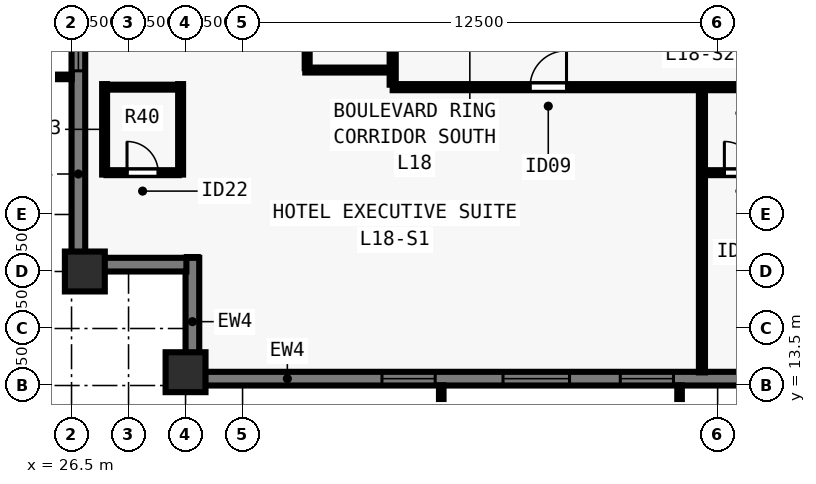
"""IFC4 building model, lengths in metres.
Left out: names, types, materials, properties, quantities, classifications, styles, units other than length and angle.
Written with IfcOpenShell. Run it as: python <this file> out.ifc"""

import sys

from ifc_helpers import new_model, si_unit, direction, frame, frame_2d, origin, origin_2d, place, context, subcontext, project, spatial, rectangle, extrude, element, fill, save


model = new_model("IFC4")
c1 = context("Model", 3, precision=1e-05, world=origin(), true_north=direction((0.0, 1.0)))
c2 = subcontext(c1, "Body", "Model", "MODEL_VIEW")
j1 = project(units=[si_unit("LENGTHUNIT", "METRE"), si_unit("PLANEANGLEUNIT", "RADIAN")], contexts=[c1])
p1 = place(None, origin())
s1 = spatial("IfcSite", under=j1, at=p1, CompositionType="ELEMENT")
p2 = place(p1, origin())
s2 = spatial("IfcBuilding", under=s1, at=p2, CompositionType="ELEMENT")
p3 = place(p2, frame((0.0, 0.0, 69.0)))
s3 = spatial("IfcBuildingStorey", under=s2, at=p3, CompositionType="ELEMENT", Elevation=69.0)
for number, where, z_axis, x_axis in (
    (1, (29.5, 13.85, 0.0), (0.0, 0.0, 1.0), (1.0, 0.0, 0.0)),
    (2, (26.85, 16.5, 0.0), (0.0, 0.0, 1.0), (0.0, 1.0, 0.0)),
):
    element("IfcColumn", number, at=place(p3, frame(where, z_axis=z_axis, x_axis=x_axis)), inside=s3, PredefinedType="COLUMN", context=c2, shape_type="SweptSolid", body=[
        extrude(rectangle(XDim=1.05, YDim=1.05, at=origin_2d()), origin(), (0.0, 0.0, 1.0), 3.5),
    ])
p4 = place(p3, frame((74.5, 13.68, 0.0), z_axis=(0.0, 0.0, 1.0), x_axis=(-1.0, 0.0, 0.0)))
e3 = element("IfcWall", 3, at=p4, inside=s3, PredefinedType="SOLIDWALL", context=c2, shape_type="SweptSolid", body=[
    extrude(rectangle(XDim=44.662, YDim=0.36, at=frame_2d((22.331, 0.0))), origin(), (0.0, 0.0, 1.0), 3.28),
])
p5 = place(p4, frame((4.83, 0.0, 0.8)))
e4 = element("IfcOpeningElement", 4, at=p5, cuts=e3, PredefinedType="OPENING", context=c2, shape_type="SweptSolid", body=[
    extrude(rectangle(XDim=1.4, YDim=1.544, at=frame_2d((0.7, 0.772))), frame((0.0, 0.19, 0.0), z_axis=(0.0, -1.0, 0.0), x_axis=(1.0, 0.0, 0.0)), (0.0, 0.0, 1.0), 0.38),
])
p6 = place(p4, frame((8.015, 0.0, 0.8)))
e5 = element("IfcOpeningElement", 5, at=p6, cuts=e3, PredefinedType="OPENING", context=c2, shape_type="SweptSolid", body=[
    extrude(rectangle(XDim=1.75, YDim=1.544, at=frame_2d((0.875, 0.772))), frame((0.0, 0.19, 0.0), z_axis=(0.0, -1.0, 0.0), x_axis=(1.0, 0.0, 0.0)), (0.0, 0.0, 1.0), 0.38),
])
p7 = place(p4, frame((11.551, 0.0, 0.8)))
e6 = element("IfcOpeningElement", 6, at=p7, cuts=e3, PredefinedType="OPENING", context=c2, shape_type="SweptSolid", body=[
    extrude(rectangle(XDim=1.4, YDim=1.544, at=frame_2d((0.7, 0.772))), frame((0.0, 0.19, 0.0), z_axis=(0.0, -1.0, 0.0), x_axis=(1.0, 0.0, 0.0)), (0.0, 0.0, 1.0), 0.38),
])
p8 = place(p4, frame((14.736, 0.0, 0.8)))
e7 = element("IfcOpeningElement", 7, at=p8, cuts=e3, PredefinedType="OPENING", context=c2, shape_type="SweptSolid", body=[
    extrude(rectangle(XDim=1.75, YDim=1.544, at=frame_2d((0.875, 0.772))), frame((0.0, 0.19, 0.0), z_axis=(0.0, -1.0, 0.0), x_axis=(1.0, 0.0, 0.0)), (0.0, 0.0, 1.0), 0.38),
])
p9 = place(p4, frame((18.721, 0.0, 0.8)))
e8 = element("IfcOpeningElement", 8, at=p9, cuts=e3, PredefinedType="OPENING", context=c2, shape_type="SweptSolid", body=[
    extrude(rectangle(XDim=1.4, YDim=1.544, at=frame_2d((0.7, 0.772))), frame((0.0, 0.19, 0.0), z_axis=(0.0, -1.0, 0.0), x_axis=(1.0, 0.0, 0.0)), (0.0, 0.0, 1.0), 0.38),
])
p10 = place(p4, frame((21.456, 0.0, 0.8)))
e9 = element("IfcOpeningElement", 9, at=p10, cuts=e3, PredefinedType="OPENING", context=c2, shape_type="SweptSolid", body=[
    extrude(rectangle(XDim=1.75, YDim=1.544, at=frame_2d((0.875, 0.772))), frame((0.0, 0.19, 0.0), z_axis=(0.0, -1.0, 0.0), x_axis=(1.0, 0.0, 0.0)), (0.0, 0.0, 1.0), 0.38),
])
p11 = place(p4, frame((24.991, 0.0, 0.8)))
e10 = element("IfcOpeningElement", 10, at=p11, cuts=e3, PredefinedType="OPENING", context=c2, shape_type="SweptSolid", body=[
    extrude(rectangle(XDim=1.4, YDim=1.544, at=frame_2d((0.7, 0.772))), frame((0.0, 0.19, 0.0), z_axis=(0.0, -1.0, 0.0), x_axis=(1.0, 0.0, 0.0)), (0.0, 0.0, 1.0), 0.38),
])
p12 = place(p4, frame((28.177, 0.0, 0.8)))
e11 = element("IfcOpeningElement", 11, at=p12, cuts=e3, PredefinedType="OPENING", context=c2, shape_type="SweptSolid", body=[
    extrude(rectangle(XDim=1.75, YDim=1.544, at=frame_2d((0.875, 0.772))), frame((0.0, 0.19, 0.0), z_axis=(0.0, -1.0, 0.0), x_axis=(1.0, 0.0, 0.0)), (0.0, 0.0, 1.0), 0.38),
])
p13 = place(p4, frame((32.162, 0.0, 0.8)))
e12 = element("IfcOpeningElement", 12, at=p13, cuts=e3, PredefinedType="OPENING", context=c2, shape_type="SweptSolid", body=[
    extrude(rectangle(XDim=1.4, YDim=1.544, at=frame_2d((0.7, 0.772))), frame((0.0, 0.19, 0.0), z_axis=(0.0, -1.0, 0.0), x_axis=(1.0, 0.0, 0.0)), (0.0, 0.0, 1.0), 0.38),
])
p14 = place(p4, frame((34.897, 0.0, 0.8)))
e13 = element("IfcOpeningElement", 13, at=p14, cuts=e3, PredefinedType="OPENING", context=c2, shape_type="SweptSolid", body=[
    extrude(rectangle(XDim=1.75, YDim=1.544, at=frame_2d((0.875, 0.772))), frame((0.0, 0.19, 0.0), z_axis=(0.0, -1.0, 0.0), x_axis=(1.0, 0.0, 0.0)), (0.0, 0.0, 1.0), 0.38),
])
p15 = place(p4, frame((38.432, 0.0, 0.8)))
e14 = element("IfcOpeningElement", 14, at=p15, cuts=e3, PredefinedType="OPENING", context=c2, shape_type="SweptSolid", body=[
    extrude(rectangle(XDim=1.4, YDim=1.544, at=frame_2d((0.7, 0.772))), frame((0.0, 0.19, 0.0), z_axis=(0.0, -1.0, 0.0), x_axis=(1.0, 0.0, 0.0)), (0.0, 0.0, 1.0), 0.38),
])
p16 = place(p3, frame((29.68, 13.5, 0.0), z_axis=(0.0, 0.0, 1.0), x_axis=(0.0, 1.0, 0.0)))
e15 = element("IfcWall", 15, at=p16, inside=s3, PredefinedType="SOLIDWALL", context=c2, shape_type="SweptSolid", body=[
    extrude(rectangle(XDim=3.36, YDim=0.36, at=frame_2d((1.68, 0.0))), origin(), (0.0, 0.0, 1.0), 3.28),
])
p17 = place(p3, frame((29.522, 16.68, 0.0), z_axis=(0.0, 0.0, 1.0), x_axis=(-1.0, 0.0, 0.0)))
e16 = element("IfcWall", 16, at=p17, inside=s3, PredefinedType="SOLIDWALL", context=c2, shape_type="SweptSolid", body=[
    extrude(rectangle(XDim=2.684, YDim=0.36, at=frame_2d((1.342, 0.0))), origin(), (0.0, 0.0, 1.0), 3.28),
])
p18 = place(p3, frame((26.68, 16.5, 0.0), z_axis=(0.0, 0.0, 1.0), x_axis=(0.0, 1.0, 0.0)))
e17 = element("IfcWall", 17, at=p18, inside=s3, PredefinedType="SOLIDWALL", context=c2, shape_type="SweptSolid", body=[
    extrude(rectangle(XDim=44.662, YDim=0.36, at=frame_2d((22.331, 0.0))), origin(), (0.0, 0.0, 1.0), 3.28),
])
p19 = place(p18, frame((5.28, 0.0, 0.8)))
e18 = element("IfcOpeningElement", 18, at=p19, cuts=e17, PredefinedType="OPENING", context=c2, shape_type="SweptSolid", body=[
    extrude(rectangle(XDim=1.4, YDim=1.544, at=frame_2d((0.7, 0.772))), frame((0.0, 0.19, 0.0), z_axis=(0.0, -1.0, 0.0), x_axis=(1.0, 0.0, 0.0)), (0.0, 0.0, 1.0), 0.38),
])
p20 = place(p18, frame((8.015, 0.0, 0.8)))
e19 = element("IfcOpeningElement", 19, at=p20, cuts=e17, PredefinedType="OPENING", context=c2, shape_type="SweptSolid", body=[
    extrude(rectangle(XDim=1.75, YDim=1.544, at=frame_2d((0.875, 0.772))), frame((0.0, 0.19, 0.0), z_axis=(0.0, -1.0, 0.0), x_axis=(1.0, 0.0, 0.0)), (0.0, 0.0, 1.0), 0.38),
])
p21 = place(p18, frame((11.551, 0.0, 0.8)))
e20 = element("IfcOpeningElement", 20, at=p21, cuts=e17, PredefinedType="OPENING", context=c2, shape_type="SweptSolid", body=[
    extrude(rectangle(XDim=1.4, YDim=1.544, at=frame_2d((0.7, 0.772))), frame((0.0, 0.19, 0.0), z_axis=(0.0, -1.0, 0.0), x_axis=(1.0, 0.0, 0.0)), (0.0, 0.0, 1.0), 0.38),
])
p22 = place(p18, frame((14.736, 0.0, 0.8)))
e21 = element("IfcOpeningElement", 21, at=p22, cuts=e17, PredefinedType="OPENING", context=c2, shape_type="SweptSolid", body=[
    extrude(rectangle(XDim=1.75, YDim=1.544, at=frame_2d((0.875, 0.772))), frame((0.0, 0.19, 0.0), z_axis=(0.0, -1.0, 0.0), x_axis=(1.0, 0.0, 0.0)), (0.0, 0.0, 1.0), 0.38),
])
p23 = place(p18, frame((18.721, 0.0, 0.8)))
e22 = element("IfcOpeningElement", 22, at=p23, cuts=e17, PredefinedType="OPENING", context=c2, shape_type="SweptSolid", body=[
    extrude(rectangle(XDim=1.4, YDim=1.544, at=frame_2d((0.7, 0.772))), frame((0.0, 0.19, 0.0), z_axis=(0.0, -1.0, 0.0), x_axis=(1.0, 0.0, 0.0)), (0.0, 0.0, 1.0), 0.38),
])
p24 = place(p18, frame((22.706, 0.0, 0.8)))
e23 = element("IfcOpeningElement", 23, at=p24, cuts=e17, PredefinedType="OPENING", context=c2, shape_type="SweptSolid", body=[
    extrude(rectangle(XDim=1.75, YDim=1.544, at=frame_2d((0.875, 0.772))), frame((0.0, 0.19, 0.0), z_axis=(0.0, -1.0, 0.0), x_axis=(1.0, 0.0, 0.0)), (0.0, 0.0, 1.0), 0.38),
])
p25 = place(p18, frame((24.991, 0.0, 0.8)))
e24 = element("IfcOpeningElement", 24, at=p25, cuts=e17, PredefinedType="OPENING", context=c2, shape_type="SweptSolid", body=[
    extrude(rectangle(XDim=1.4, YDim=1.544, at=frame_2d((0.7, 0.772))), frame((0.0, 0.19, 0.0), z_axis=(0.0, -1.0, 0.0), x_axis=(1.0, 0.0, 0.0)), (0.0, 0.0, 1.0), 0.38),
])
p26 = place(p18, frame((28.177, 0.0, 0.8)))
e25 = element("IfcOpeningElement", 25, at=p26, cuts=e17, PredefinedType="OPENING", context=c2, shape_type="SweptSolid", body=[
    extrude(rectangle(XDim=1.75, YDim=1.544, at=frame_2d((0.875, 0.772))), frame((0.0, 0.19, 0.0), z_axis=(0.0, -1.0, 0.0), x_axis=(1.0, 0.0, 0.0)), (0.0, 0.0, 1.0), 0.38),
])
p27 = place(p18, frame((31.711, 0.0, 0.8)))
e26 = element("IfcOpeningElement", 26, at=p27, cuts=e17, PredefinedType="OPENING", context=c2, shape_type="SweptSolid", body=[
    extrude(rectangle(XDim=1.4, YDim=1.544, at=frame_2d((0.7, 0.772))), frame((0.0, 0.19, 0.0), z_axis=(0.0, -1.0, 0.0), x_axis=(1.0, 0.0, 0.0)), (0.0, 0.0, 1.0), 0.38),
])
p28 = place(p18, frame((34.897, 0.0, 0.8)))
e27 = element("IfcOpeningElement", 27, at=p28, cuts=e17, PredefinedType="OPENING", context=c2, shape_type="SweptSolid", body=[
    extrude(rectangle(XDim=1.75, YDim=1.544, at=frame_2d((0.875, 0.772))), frame((0.0, 0.19, 0.0), z_axis=(0.0, -1.0, 0.0), x_axis=(1.0, 0.0, 0.0)), (0.0, 0.0, 1.0), 0.38),
])
p29 = place(p18, frame((37.982, 0.0, 0.8)))
e28 = element("IfcOpeningElement", 28, at=p29, cuts=e17, PredefinedType="OPENING", context=c2, shape_type="SweptSolid", body=[
    extrude(rectangle(XDim=1.4, YDim=1.544, at=frame_2d((0.7, 0.772))), frame((0.0, 0.19, 0.0), z_axis=(0.0, -1.0, 0.0), x_axis=(1.0, 0.0, 0.0)), (0.0, 0.0, 1.0), 0.38),
])
p30 = place(p3, frame((34.95, 21.35, 0.0), z_axis=(0.0, 0.0, 1.0), x_axis=(1.0, 0.0, 0.0)))
e29 = element("IfcWall", 29, at=p30, inside=s3, PredefinedType="PARTITIONING", context=c2, shape_type="SweptSolid", body=[
    extrude(rectangle(XDim=34.1, YDim=0.16, at=frame_2d((17.05, 0.0))), origin(), (0.0, 0.0, 1.0), 3.28),
])
p31 = place(p30, frame((3.614, 0.0, 0.0)))
e30 = element("IfcOpeningElement", 30, at=p31, cuts=e29, PredefinedType="OPENING", context=c2, shape_type="SweptSolid", body=[
    extrude(rectangle(XDim=0.96, YDim=2.15, at=frame_2d((0.48, 1.075))), frame((0.0, 0.09, 0.0), z_axis=(0.0, -1.0, 0.0), x_axis=(1.0, 0.0, 0.0)), (0.0, 0.0, 1.0), 0.18),
])
p32 = place(p30, frame((17.56, 0.0, 0.0)))
e31 = element("IfcOpeningElement", 31, at=p32, cuts=e29, PredefinedType="OPENING", context=c2, shape_type="SweptSolid", body=[
    extrude(rectangle(XDim=0.96, YDim=2.15, at=frame_2d((0.48, 1.075))), frame((0.0, 0.09, 0.0), z_axis=(0.0, -1.0, 0.0), x_axis=(1.0, 0.0, 0.0)), (0.0, 0.0, 1.0), 0.18),
])
p33 = place(p30, frame((30.516, 0.0, 0.0)))
e32 = element("IfcOpeningElement", 32, at=p33, cuts=e29, PredefinedType="OPENING", context=c2, shape_type="SweptSolid", body=[
    extrude(rectangle(XDim=0.96, YDim=2.15, at=frame_2d((0.48, 1.075))), frame((0.0, 0.09, 0.0), z_axis=(0.0, -1.0, 0.0), x_axis=(1.0, 0.0, 0.0)), (0.0, 0.0, 1.0), 0.18),
])
p34 = place(p3, frame((34.95, 21.415, 0.0), z_axis=(0.0, 0.0, 1.0), x_axis=(0.0, 1.0, 0.0)))
e33 = element("IfcWall", 33, at=p34, inside=s3, PredefinedType="PARTITIONING", context=c2, shape_type="SweptSolid", body=[
    extrude(rectangle(XDim=35.17, YDim=0.16, at=frame_2d((17.585, 0.0))), origin(), (0.0, 0.0, 1.0), 3.28),
])
p35 = place(p34, frame((9.414, 0.0, 0.0)))
e34 = element("IfcOpeningElement", 34, at=p35, cuts=e33, PredefinedType="OPENING", context=c2, shape_type="SweptSolid", body=[
    extrude(rectangle(XDim=0.96, YDim=2.15, at=frame_2d((0.48, 1.075))), frame((0.0, 0.09, 0.0), z_axis=(0.0, -1.0, 0.0), x_axis=(1.0, 0.0, 0.0)), (0.0, 0.0, 1.0), 0.18),
])
p36 = place(p34, frame((26.814, 0.0, 0.0)))
e35 = element("IfcOpeningElement", 35, at=p36, cuts=e33, PredefinedType="OPENING", context=c2, shape_type="SweptSolid", body=[
    extrude(rectangle(XDim=0.96, YDim=2.15, at=frame_2d((0.48, 1.075))), frame((0.0, 0.09, 0.0), z_axis=(0.0, -1.0, 0.0), x_axis=(1.0, 0.0, 0.0)), (0.0, 0.0, 1.0), 0.18),
])
for number, where, z_axis, x_axis in (
    (36, (27.37, 19.05, 0.0), (0.0, 0.0, 1.0), (0.0, 1.0, 0.0)),
    (37, (29.37, 19.05, 0.0), (0.0, 0.0, 1.0), (0.0, 1.0, 0.0)),
):
    element("IfcWall", number, at=place(p3, frame(where, z_axis=z_axis, x_axis=x_axis)), inside=s3, PredefinedType="PLUMBINGWALL", context=c2, shape_type="SweptSolid", body=[
        extrude(rectangle(XDim=2.38, YDim=0.13, at=frame_2d((1.19, 0.0))), origin(), (0.0, 0.0, 1.0), 3.28),
    ])
p37 = place(p3, frame((27.42, 19.1, 0.0), z_axis=(0.0, 0.0, 1.0), x_axis=(1.0, 0.0, 0.0)))
e38 = element("IfcWall", 38, at=p37, inside=s3, PredefinedType="PLUMBINGWALL", context=c2, shape_type="SweptSolid", body=[
    extrude(rectangle(XDim=1.9, YDim=0.13, at=frame_2d((0.95, 0.0))), origin(), (0.0, 0.0, 1.0), 3.28),
])
p38 = place(p37, frame((0.54, 0.0, 0.0)))
e39 = element("IfcOpeningElement", 39, at=p38, cuts=e38, PredefinedType="OPENING", context=c2, shape_type="SweptSolid", body=[
    extrude(rectangle(XDim=0.82, YDim=2.1, at=frame_2d((0.41, 1.05))), frame((0.0, 0.075, 0.0), z_axis=(0.0, -1.0, 0.0), x_axis=(1.0, 0.0, 0.0)), (0.0, 0.0, 1.0), 0.15),
])
p39 = place(p3, frame((27.42, 21.35, 0.0), z_axis=(0.0, 0.0, 1.0), x_axis=(1.0, 0.0, 0.0)))
e40 = element("IfcWall", 40, at=p39, inside=s3, PredefinedType="PLUMBINGWALL", context=c2, shape_type="SweptSolid", body=[
    extrude(rectangle(XDim=1.9, YDim=0.13, at=frame_2d((0.95, 0.0))), origin(), (0.0, 0.0, 1.0), 3.28),
])
p40 = place(p3, frame((43.087, 13.845, 0.0), z_axis=(0.0, 0.0, 1.0), x_axis=(0.0, 1.0, 0.0)))
e41 = element("IfcWall", 41, at=p40, inside=s3, PredefinedType="PARTITIONING", context=c2, shape_type="SweptSolid", body=[
    extrude(rectangle(XDim=7.44, YDim=0.16, at=frame_2d((3.72, 0.0))), origin(), (0.0, 0.0, 1.0), 3.28),
])
p41 = place(p3, frame((43.153, 19.1, 0.0), z_axis=(0.0, 0.0, 1.0), x_axis=(1.0, 0.0, 0.0)))
e42 = element("IfcWall", 42, at=p41, inside=s3, PredefinedType="PLUMBINGWALL", context=c2, shape_type="SweptSolid", body=[
    extrude(rectangle(XDim=1.885, YDim=0.13, at=frame_2d((0.942, 0.0))), origin(), (0.0, 0.0, 1.0), 3.28),
])
p42 = place(p41, frame((0.525, 0.0, 0.0)))
e43 = element("IfcOpeningElement", 43, at=p42, cuts=e42, PredefinedType="OPENING", context=c2, shape_type="SweptSolid", body=[
    extrude(rectangle(XDim=0.82, YDim=2.1, at=frame_2d((0.41, 1.05))), frame((0.0, 0.075, 0.0), z_axis=(0.0, -1.0, 0.0), x_axis=(1.0, 0.0, 0.0)), (0.0, 0.0, 1.0), 0.15),
])
p43 = place(p3, frame((32.65, 21.8, 0.0), z_axis=(0.0, 0.0, 1.0), x_axis=(1.0, 0.0, 0.0)))
e44 = element("IfcWall", 44, at=p43, inside=s3, PredefinedType="PLUMBINGWALL", context=c2, shape_type="SweptSolid", body=[
    extrude(rectangle(XDim=2.235, YDim=0.13, at=frame_2d((1.118, 0.0))), origin(), (0.0, 0.0, 1.0), 2.849),
])
p44 = place(p3, frame((32.7, 21.85, 0.0), z_axis=(0.0, 0.0, 1.0), x_axis=(0.0, 1.0, 0.0)))
e45 = element("IfcWall", 45, at=p44, inside=s3, PredefinedType="PLUMBINGWALL", context=c2, shape_type="SweptSolid", body=[
    extrude(rectangle(XDim=1.9, YDim=0.13, at=frame_2d((0.95, 0.0))), origin(), (0.0, 0.0, 1.0), 3.28),
])
p45 = place(p44, frame((0.54, 0.0, 0.0)))
e46 = element("IfcOpeningElement", 46, at=p45, cuts=e45, PredefinedType="OPENING", context=c2, shape_type="SweptSolid", body=[
    extrude(rectangle(XDim=0.82, YDim=2.1, at=frame_2d((0.41, 1.05))), frame((0.0, 0.075, 0.0), z_axis=(0.0, -1.0, 0.0), x_axis=(1.0, 0.0, 0.0)), (0.0, 0.0, 1.0), 0.15),
])
p46 = place(p13, origin())
e47 = element("IfcWindow", 47, at=p46, inside=s3, PartitioningType="SINGLE_PANEL", PredefinedType="WINDOW", context=c2, shape_type="SweptSolid", body=[
    extrude(rectangle(XDim=1.4, YDim=1.544, at=frame_2d((0.7, 0.772))), frame((0.0, -0.05, 0.0), z_axis=(0.0, -1.0, 0.0), x_axis=(1.0, 0.0, 0.0)), (0.0, 0.0, 1.0), 0.06),
])
fill(e12, e47)
p47 = place(p14, origin())
e48 = element("IfcWindow", 48, at=p47, inside=s3, PartitioningType="SINGLE_PANEL", PredefinedType="WINDOW", context=c2, shape_type="SweptSolid", body=[
    extrude(rectangle(XDim=1.75, YDim=1.544, at=frame_2d((0.875, 0.772))), frame((0.0, -0.05, 0.0), z_axis=(0.0, -1.0, 0.0), x_axis=(1.0, 0.0, 0.0)), (0.0, 0.0, 1.0), 0.06),
])
fill(e13, e48)
p48 = place(p15, origin())
e49 = element("IfcWindow", 49, at=p48, inside=s3, PartitioningType="SINGLE_PANEL", PredefinedType="WINDOW", context=c2, shape_type="SweptSolid", body=[
    extrude(rectangle(XDim=1.4, YDim=1.544, at=frame_2d((0.7, 0.772))), frame((0.0, -0.05, 0.0), z_axis=(0.0, -1.0, 0.0), x_axis=(1.0, 0.0, 0.0)), (0.0, 0.0, 1.0), 0.06),
])
fill(e14, e49)
p49 = place(p19, origin())
e50 = element("IfcWindow", 50, at=p49, inside=s3, PartitioningType="SINGLE_PANEL", PredefinedType="WINDOW", context=c2, shape_type="SweptSolid", body=[
    extrude(rectangle(XDim=1.4, YDim=1.544, at=frame_2d((0.7, 0.772))), frame((0.0, -0.05, 0.0), z_axis=(0.0, -1.0, 0.0), x_axis=(1.0, 0.0, 0.0)), (0.0, 0.0, 1.0), 0.06),
])
fill(e18, e50)
p50 = place(p38, origin())
e51 = element("IfcDoor", 51, at=p50, inside=s3, OperationType="SINGLE_SWING_LEFT", PredefinedType="DOOR", context=c2, shape_type="SweptSolid", body=[
    extrude(rectangle(XDim=0.82, YDim=2.1, at=frame_2d((0.41, 1.05))), frame((0.0, 0.025, 0.0), z_axis=(0.0, -1.0, 0.0), x_axis=(1.0, 0.0, 0.0)), (0.0, 0.0, 1.0), 0.05),
])
fill(e39, e51)
p51 = place(p31, origin())
e52 = element("IfcDoor", 52, at=p51, inside=s3, OperationType="SINGLE_SWING_RIGHT", PredefinedType="DOOR", context=c2, shape_type="SweptSolid", body=[
    extrude(rectangle(XDim=0.96, YDim=2.15, at=frame_2d((0.48, 1.075))), frame((0.0, 0.025, 0.0), z_axis=(0.0, -1.0, 0.0), x_axis=(1.0, 0.0, 0.0)), (0.0, 0.0, 1.0), 0.05),
])
fill(e30, e52)
p52 = place(p42, origin())
e53 = element("IfcDoor", 53, at=p52, inside=s3, OperationType="SINGLE_SWING_LEFT", PredefinedType="DOOR", context=c2, shape_type="SweptSolid", body=[
    extrude(rectangle(XDim=0.82, YDim=2.1, at=frame_2d((0.41, 1.05))), frame((0.0, 0.025, 0.0), z_axis=(0.0, -1.0, 0.0), x_axis=(1.0, 0.0, 0.0)), (0.0, 0.0, 1.0), 0.05),
])
fill(e43, e53)
save(model, sys.argv[1])
